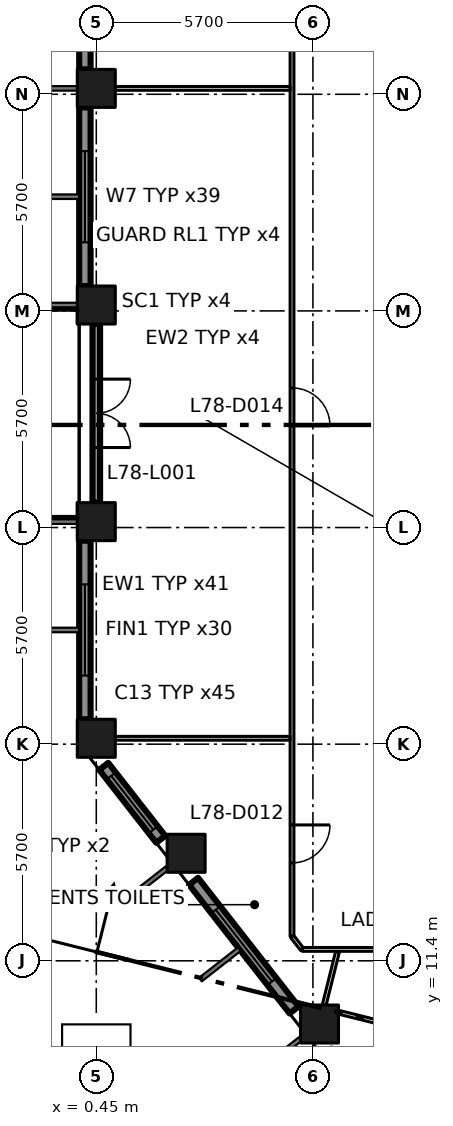
"""IFC4 building model, lengths in metres.
Left out: names, types, materials, properties, quantities, classifications, styles, units other than length and angle.
Written with IfcOpenShell. Run it as: python <this file> out.ifc"""

import sys

from ifc_helpers import new_model, si_unit, direction, frame, frame_2d, origin, origin_2d, place, context, subcontext, project, spatial, rectangle, extrude, element, fill, save


model = new_model("IFC4")
c1 = context("Model", 3, precision=1e-05, world=origin(), true_north=direction((0.0, 1.0)))
c2 = subcontext(c1, "Body", "Model", "MODEL_VIEW")
j1 = project(units=[si_unit("LENGTHUNIT", "METRE"), si_unit("PLANEANGLEUNIT", "RADIAN")], contexts=[c1])
p1 = place(None, origin())
s1 = spatial("IfcSite", under=j1, at=p1, CompositionType="ELEMENT")
p2 = place(p1, origin())
s2 = spatial("IfcBuilding", under=s1, at=p2, CompositionType="ELEMENT")
p3 = place(p2, frame((0.0, 0.0, 340.2)))
s3 = spatial("IfcBuildingStorey", under=s2, at=p3, CompositionType="ELEMENT", Elevation=340.2)
for number, where, z_axis, x_axis in (
    (1, (0.45, 17.255, 0.0), (0.0, 0.0, 1.0), (1.0, 0.0, 0.0)),
    (2, (0.45, 22.955, 0.0), (0.0, 0.0, 1.0), (1.0, 0.0, 0.0)),
    (3, (0.45, 28.655, 0.0), (0.0, 0.0, 1.0), (1.0, 0.0, 0.0)),
    (4, (0.45, 34.355, 0.0), (0.0, 0.0, 1.0), (1.0, 0.0, 0.0)),
    (5, (6.323, 9.737, 0.0), (0.0, 0.0, 1.0), (1.0, 0.0, 0.0)),
    (6, (2.814, 14.229, 0.0), (0.0, 0.0, 1.0), (1.0, 0.0, 0.0)),
):
    element("IfcColumn", number, at=place(p3, frame(where, z_axis=z_axis, x_axis=x_axis)), inside=s3, PredefinedType="COLUMN", context=c2, shape_type="SweptSolid", body=[
        extrude(rectangle(XDim=1.0, YDim=1.0, at=origin_2d()), origin(), (0.0, 0.0, 1.0), 4.2),
    ])
p4 = place(p3, frame((0.15, 39.555, 0.0), z_axis=(0.0, 0.0, 1.0), x_axis=(0.0, -1.0, 0.0)))
e7 = element("IfcWall", 7, at=p4, inside=s3, PredefinedType="SOLIDWALL", context=c2, shape_type="SweptSolid", body=[
    extrude(rectangle(XDim=4.7, YDim=0.3, at=frame_2d((2.35, 0.0))), origin(), (0.0, 0.0, 1.0), 3.2),
])
p5 = place(p4, frame((1.15, 0.0, 0.8)))
e8 = element("IfcOpeningElement", 8, at=p5, cuts=e7, PredefinedType="OPENING", context=c2, shape_type="SweptSolid", body=[
    extrude(rectangle(XDim=2.4, YDim=2.1, at=frame_2d((1.2, 1.05))), frame((0.0, 0.16, 0.0), z_axis=(0.0, -1.0, 0.0), x_axis=(1.0, 0.0, 0.0)), (0.0, 0.0, 1.0), 0.32),
])
p6 = place(p3, frame((0.15, 33.855, 0.0), z_axis=(0.0, 0.0, 1.0), x_axis=(0.0, -1.0, 0.0)))
e9 = element("IfcWall", 9, at=p6, inside=s3, PredefinedType="SOLIDWALL", context=c2, shape_type="SweptSolid", body=[
    extrude(rectangle(XDim=4.7, YDim=0.3, at=frame_2d((2.35, 0.0))), origin(), (0.0, 0.0, 1.0), 3.2),
])
p7 = place(p6, frame((1.15, 0.0, 0.8)))
e10 = element("IfcOpeningElement", 10, at=p7, cuts=e9, PredefinedType="OPENING", context=c2, shape_type="SweptSolid", body=[
    extrude(rectangle(XDim=2.4, YDim=2.1, at=frame_2d((1.2, 1.05))), frame((0.0, 0.16, 0.0), z_axis=(0.0, -1.0, 0.0), x_axis=(1.0, 0.0, 0.0)), (0.0, 0.0, 1.0), 0.32),
])
p8 = place(p3, frame((0.45, 28.155, 0.0), z_axis=(0.0, 0.0, 1.0), x_axis=(0.0, -1.0, 0.0)))
e11 = element("IfcWall", 11, at=p8, inside=s3, PredefinedType="SOLIDWALL", context=c2, shape_type="SweptSolid", body=[
    extrude(rectangle(XDim=4.699, YDim=0.2, at=frame_2d((2.35, 0.0))), origin(), (0.0, 0.0, 1.0), 3.2),
])
p9 = place(p8, frame((1.45, 0.0, 0.0)))
e12 = element("IfcOpeningElement", 12, at=p9, cuts=e11, PredefinedType="OPENING", context=c2, shape_type="SweptSolid", body=[
    extrude(rectangle(XDim=1.8, YDim=2.9, at=frame_2d((0.9, 1.45))), frame((0.0, 0.11, 0.0), z_axis=(0.0, -1.0, 0.0), x_axis=(1.0, 0.0, 0.0)), (0.0, 0.0, 1.0), 0.22),
])
p10 = place(p3, frame((0.15, 22.455, 0.0), z_axis=(0.0, 0.0, 1.0), x_axis=(0.0, -1.0, 0.0)))
e13 = element("IfcWall", 13, at=p10, inside=s3, PredefinedType="SOLIDWALL", context=c2, shape_type="SweptSolid", body=[
    extrude(rectangle(XDim=4.7, YDim=0.3, at=frame_2d((2.35, 0.0))), origin(), (0.0, 0.0, 1.0), 3.2),
])
p11 = place(p10, frame((1.15, 0.0, 0.8)))
e14 = element("IfcOpeningElement", 14, at=p11, cuts=e13, PredefinedType="OPENING", context=c2, shape_type="SweptSolid", body=[
    extrude(rectangle(XDim=2.4, YDim=2.1, at=frame_2d((1.2, 1.05))), frame((0.0, 0.16, 0.0), z_axis=(0.0, -1.0, 0.0), x_axis=(1.0, 0.0, 0.0)), (0.0, 0.0, 1.0), 0.32),
])
p12 = place(p3, frame((0.646, 16.517, 0.0), z_axis=(0.0, 0.0, 1.0), x_axis=(0.615610986717, -0.788050197026, 0.0)))
e15 = element("IfcWall", 15, at=p12, inside=s3, PredefinedType="SOLIDWALL", context=c2, shape_type="SweptSolid", body=[
    extrude(rectangle(XDim=2.437, YDim=0.3, at=frame_2d((1.218, 0.0))), origin(), (0.0, 0.0, 1.0), 3.2),
])
p13 = place(p12, frame((0.318, 0.0, 0.8)))
e16 = element("IfcOpeningElement", 16, at=p13, cuts=e15, PredefinedType="OPENING", context=c2, shape_type="SweptSolid", body=[
    extrude(rectangle(XDim=1.8, YDim=2.1, at=frame_2d((0.9, 1.05))), frame((0.0, 0.16, 0.0), z_axis=(0.0, -1.0, 0.0), x_axis=(1.0, 0.0, 0.0)), (0.0, 0.0, 1.0), 0.32),
])
p14 = place(p3, frame((3.01, 13.491, 0.0), z_axis=(0.0, 0.0, 1.0), x_axis=(0.615713519567, -0.787970089421, 0.0)))
e17 = element("IfcWall", 17, at=p14, inside=s3, PredefinedType="SOLIDWALL", context=c2, shape_type="SweptSolid", body=[
    extrude(rectangle(XDim=4.296, YDim=0.3, at=frame_2d((2.148, 0.0))), origin(), (0.0, 0.0, 1.0), 3.2),
])
p15 = place(p14, frame((0.948, 0.0, 0.8)))
e18 = element("IfcOpeningElement", 18, at=p15, cuts=e17, PredefinedType="OPENING", context=c2, shape_type="SweptSolid", body=[
    extrude(rectangle(XDim=2.4, YDim=2.1, at=frame_2d((1.2, 1.05))), frame((0.0, 0.16, 0.0), z_axis=(0.0, -1.0, 0.0), x_axis=(1.0, 0.0, 0.0)), (0.0, 0.0, 1.0), 0.32),
])
p16 = place(p3, frame((5.6, 12.044, 0.0), z_axis=(0.0, 0.0, 1.0), x_axis=(0.614328236968, -0.789050579661, 0.0)))
e19 = element("IfcWall", 19, at=p16, inside=s3, PredefinedType="PARTITIONING", context=c2, shape_type="SweptSolid", body=[
    extrude(rectangle(XDim=0.436, YDim=0.1, at=frame_2d((0.218, 0.0))), origin(), (0.0, 0.0, 1.0), 3.9),
])
p17 = place(p3, frame((5.6, 39.3, 0.0), z_axis=(0.0, 0.0, 1.0), x_axis=(0.0, -1.0, 0.0)))
e20 = element("IfcWall", 20, at=p17, inside=s3, PredefinedType="PARTITIONING", context=c2, shape_type="SweptSolid", body=[
    extrude(rectangle(XDim=27.256, YDim=0.1, at=frame_2d((13.628, 0.0))), origin(), (0.0, 0.0, 1.0), 3.9),
])
p18 = place(p17, frame((24.325, 0.0, 0.0)))
e21 = element("IfcOpeningElement", 21, at=p18, cuts=e20, PredefinedType="OPENING", context=c2, shape_type="SweptSolid", body=[
    extrude(rectangle(XDim=1.0, YDim=2.1, at=frame_2d((0.5, 1.05))), frame((0.0, 0.06, 0.0), z_axis=(0.0, -1.0, 0.0), x_axis=(1.0, 0.0, 0.0)), (0.0, 0.0, 1.0), 0.12),
])
p19 = place(p17, frame((12.825, 0.0, 0.0)))
e22 = element("IfcOpeningElement", 22, at=p19, cuts=e20, PredefinedType="OPENING", context=c2, shape_type="SweptSolid", body=[
    extrude(rectangle(XDim=1.0, YDim=2.1, at=frame_2d((0.5, 1.05))), frame((0.0, 0.06, 0.0), z_axis=(0.0, -1.0, 0.0), x_axis=(1.0, 0.0, 0.0)), (0.0, 0.0, 1.0), 0.12),
])
p20 = place(p3, frame((5.868, 11.7, 0.0), z_axis=(0.0, 0.0, 1.0), x_axis=(1.0, 0.0, 0.0)))
e23 = element("IfcWall", 23, at=p20, inside=s3, PredefinedType="PARTITIONING", context=c2, shape_type="SweptSolid", body=[
    extrude(rectangle(XDim=4.032, YDim=0.1, at=frame_2d((2.016, 0.0))), origin(), (0.0, 0.0, 1.0), 3.9),
])
for number, where, z_axis, x_axis in (
    (24, (5.55, 17.255, 0.0), (0.0, 0.0, 1.0), (-1.0, 0.0, 0.0)),
    (25, (5.55, 34.355, 0.0), (0.0, 0.0, 1.0), (-1.0, 0.0, 0.0)),
):
    element("IfcWall", number, at=place(p3, frame(where, z_axis=z_axis, x_axis=x_axis)), inside=s3, PredefinedType="PARTITIONING", context=c2, shape_type="SweptSolid", body=[
        extrude(rectangle(XDim=4.6, YDim=0.1, at=frame_2d((2.3, 0.0))), origin(), (0.0, 0.0, 1.0), 3.9),
    ])
p21 = place(p3, frame((6.797, 11.638, 0.0), z_axis=(0.0, 0.0, 1.0), x_axis=(-0.242456058691, -0.970162388265, 0.0)))
e26 = element("IfcWall", 26, at=p21, inside=s3, PredefinedType="PARTITIONING", context=c2, shape_type="SweptSolid", body=[
    extrude(rectangle(XDim=1.444, YDim=0.1, at=frame_2d((0.722, 0.0))), origin(), (0.0, 0.0, 1.0), 3.9),
])
p22 = place(p3, frame((8.72, 9.575, 0.0), z_axis=(0.0, 0.0, 1.0), x_axis=(-0.970274576003, 0.242006708918, 0.0)))
e27 = element("IfcWall", 27, at=p22, inside=s3, PredefinedType="PARTITIONING", context=c2, shape_type="SweptSolid", body=[
    extrude(rectangle(XDim=1.955, YDim=0.1, at=frame_2d((0.978, 0.0))), origin(), (0.0, 0.0, 1.0), 3.9),
])
p23 = place(p7, origin())
e28 = element("IfcWindow", 28, at=p23, inside=s3, PartitioningType="DOUBLE_PANEL_VERTICAL", PredefinedType="WINDOW", context=c2, shape_type="SweptSolid", body=[
    extrude(rectangle(XDim=2.4, YDim=2.1, at=frame_2d((1.2, 1.05))), frame((0.0, 0.03, 0.0), z_axis=(0.0, -1.0, 0.0), x_axis=(1.0, 0.0, 0.0)), (0.0, 0.0, 1.0), 0.06),
])
fill(e10, e28)
p24 = place(p9, origin())
e29 = element("IfcDoor", 29, at=p24, inside=s3, OperationType="DOUBLE_DOOR_SINGLE_SWING", PredefinedType="DOOR", context=c2, shape_type="SweptSolid", body=[
    extrude(rectangle(XDim=1.8, YDim=2.9, at=frame_2d((0.9, 1.45))), frame((0.0, 0.025, 0.0), z_axis=(0.0, -1.0, 0.0), x_axis=(1.0, 0.0, 0.0)), (0.0, 0.0, 1.0), 0.05),
])
fill(e12, e29)
p25 = place(p11, origin())
e30 = element("IfcWindow", 30, at=p25, inside=s3, PartitioningType="DOUBLE_PANEL_VERTICAL", PredefinedType="WINDOW", context=c2, shape_type="SweptSolid", body=[
    extrude(rectangle(XDim=2.4, YDim=2.1, at=frame_2d((1.2, 1.05))), frame((0.0, 0.03, 0.0), z_axis=(0.0, -1.0, 0.0), x_axis=(1.0, 0.0, 0.0)), (0.0, 0.0, 1.0), 0.06),
])
fill(e14, e30)
p26 = place(p13, origin())
e31 = element("IfcWindow", 31, at=p26, inside=s3, PartitioningType="DOUBLE_PANEL_VERTICAL", PredefinedType="WINDOW", context=c2, shape_type="SweptSolid", body=[
    extrude(rectangle(XDim=1.8, YDim=2.1, at=frame_2d((0.9, 1.05))), frame((0.0, 0.03, 0.0), z_axis=(0.0, -1.0, 0.0), x_axis=(1.0, 0.0, 0.0)), (0.0, 0.0, 1.0), 0.06),
])
fill(e16, e31)
p27 = place(p15, origin())
e32 = element("IfcWindow", 32, at=p27, inside=s3, PartitioningType="DOUBLE_PANEL_VERTICAL", PredefinedType="WINDOW", context=c2, shape_type="SweptSolid", body=[
    extrude(rectangle(XDim=2.4, YDim=2.1, at=frame_2d((1.2, 1.05))), frame((0.0, 0.03, 0.0), z_axis=(0.0, -1.0, 0.0), x_axis=(1.0, 0.0, 0.0)), (0.0, 0.0, 1.0), 0.06),
])
fill(e18, e32)
p28 = place(p18, origin())
e33 = element("IfcDoor", 33, at=p28, inside=s3, OperationType="SINGLE_SWING_LEFT", PredefinedType="DOOR", context=c2, shape_type="SweptSolid", body=[
    extrude(rectangle(XDim=1.0, YDim=2.1, at=frame_2d((0.5, 1.05))), frame((0.0, 0.025, 0.0), z_axis=(0.0, -1.0, 0.0), x_axis=(1.0, 0.0, 0.0)), (0.0, 0.0, 1.0), 0.05),
])
fill(e21, e33)
p29 = place(p19, origin())
e34 = element("IfcDoor", 34, at=p29, inside=s3, OperationType="SINGLE_SWING_RIGHT", PredefinedType="DOOR", context=c2, shape_type="SweptSolid", body=[
    extrude(rectangle(XDim=1.0, YDim=2.1, at=frame_2d((0.5, 1.05))), frame((0.0, 0.025, 0.0), z_axis=(0.0, -1.0, 0.0), x_axis=(1.0, 0.0, 0.0)), (0.0, 0.0, 1.0), 0.05),
])
fill(e22, e34)
save(model, sys.argv[1])
